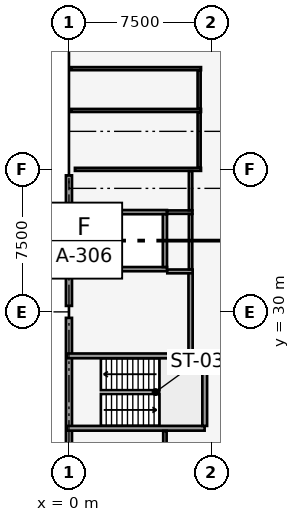
"""IFC4 building model, lengths in metres.
Left out: names, types, materials, properties, quantities, classifications, styles, units other than length and angle.
Written with IfcOpenShell. Run it as: python <this file> out.ifc"""

import sys

from ifc_helpers import new_model, si_unit, direction, frame, frame_2d, origin, origin_2d, place, context, subcontext, project, spatial, rectangle, extrude, element, fill, save


model = new_model("IFC4")
c1 = context("Model", 3, precision=1e-05, world=origin(), true_north=direction((0.0, 1.0)))
c2 = subcontext(c1, "Body", "Model", "MODEL_VIEW")
j1 = project(units=[si_unit("LENGTHUNIT", "METRE"), si_unit("PLANEANGLEUNIT", "RADIAN")], contexts=[c1])
p1 = place(None, origin())
s1 = spatial("IfcSite", under=j1, at=p1, CompositionType="ELEMENT")
p2 = place(p1, origin())
s2 = spatial("IfcBuilding", under=s1, at=p2, CompositionType="ELEMENT")
p3 = place(p2, frame((0.0, 0.0, 9.0)))
s3 = spatial("IfcBuildingStorey", under=s2, at=p3, CompositionType="ELEMENT", Elevation=9.0)
for number, where, z_axis, x_axis in (
    (1, (0.0, 30.0, 0.0), (0.0, 0.0, 1.0), (1.0, 0.0, 0.0)),
    (2, (0.0, 37.5, 0.0), (0.0, 0.0, 1.0), (1.0, 0.0, 0.0)),
):
    element("IfcColumn", number, at=place(p3, frame(where, z_axis=z_axis, x_axis=x_axis)), inside=s3, PredefinedType="COLUMN", context=c2, shape_type="SweptSolid", body=[
        extrude(rectangle(XDim=0.6, YDim=0.6, at=origin_2d()), origin(), (0.0, 0.0, 1.0), 4.2),
    ])
for number, where, z_axis, x_axis in (
    (3, (0.0, 22.815, 0.0), (0.0, 0.0, 1.0), (0.0, 1.0, 0.0)),
    (4, (0.0, 30.315, 0.0), (0.0, 0.0, 1.0), (0.0, 1.0, 0.0)),
):
    element("IfcWall", number, at=place(p3, frame(where, z_axis=z_axis, x_axis=x_axis)), inside=s3, PredefinedType="SOLIDWALL", context=c2, shape_type="SweptSolid", body=[
        extrude(rectangle(XDim=6.87, YDim=0.32, at=frame_2d((3.435, 0.0))), origin(), (0.0, 0.0, 1.0), 2.87),
    ])
p4 = place(p3, frame((-0.12, 23.875, 0.0), z_axis=(0.0, 0.0, 1.0), x_axis=(1.0, 0.0, 0.0)))
e5 = element("IfcWall", 5, at=p4, inside=s3, PredefinedType="SOLIDWALL", context=c2, shape_type="SweptSolid", body=[
    extrude(rectangle(XDim=7.26, YDim=0.25, at=frame_2d((3.63, 0.0))), origin(), (0.0, 0.0, 1.0), 3.92),
])
p5 = place(p3, frame((-0.12, 27.685, 0.0), z_axis=(0.0, 0.0, 1.0), x_axis=(1.0, 0.0, 0.0)))
e6 = element("IfcWall", 6, at=p5, inside=s3, PredefinedType="SOLIDWALL", context=c2, shape_type="SweptSolid", body=[
    extrude(rectangle(XDim=7.26, YDim=0.25, at=frame_2d((3.63, 0.0))), origin(), (0.0, 0.0, 1.0), 3.92),
])
p6 = place(p5, frame((0.45, 0.0, 0.0)))
e7 = element("IfcOpeningElement", 7, at=p6, cuts=e6, PredefinedType="OPENING", context=c2, shape_type="SweptSolid", body=[
    extrude(rectangle(XDim=1.1, YDim=2.15, at=frame_2d((0.55, 1.075))), frame((0.0, 0.135, 0.0), z_axis=(0.0, -1.0, 0.0), x_axis=(1.0, 0.0, 0.0)), (0.0, 0.0, 1.0), 0.27),
])
p7 = place(p3, frame((7.145, 24.0, 0.0), z_axis=(0.0, 0.0, 1.0), x_axis=(0.0, 1.0, 0.0)))
e8 = element("IfcWall", 8, at=p7, inside=s3, PredefinedType="SOLIDWALL", context=c2, shape_type="SweptSolid", body=[
    extrude(rectangle(XDim=3.56, YDim=0.25, at=frame_2d((1.78, 0.0))), origin(), (0.0, 0.0, 1.0), 3.92),
])
p8 = place(p3, frame((2.34, 32.25, 0.0), z_axis=(0.0, 0.0, 1.0), x_axis=(1.0, 0.0, 0.0)))
e9 = element("IfcWall", 9, at=p8, inside=s3, PredefinedType="SOLIDWALL", context=c2, shape_type="SweptSolid", body=[
    extrude(rectangle(XDim=2.82, YDim=0.22, at=frame_2d((1.41, 0.0))), origin(), (0.0, 0.0, 1.0), 3.92),
])
p9 = place(p8, frame((0.86, 0.0, 0.0)))
e10 = element("IfcOpeningElement", 10, at=p9, cuts=e9, PredefinedType="OPENING", context=c2, shape_type="SweptSolid", body=[
    extrude(rectangle(XDim=1.1, YDim=2.15, at=frame_2d((0.55, 1.075))), frame((0.0, 0.12, 0.0), z_axis=(0.0, -1.0, 0.0), x_axis=(1.0, 0.0, 0.0)), (0.0, 0.0, 1.0), 0.24),
])
p10 = place(p3, frame((2.34, 35.25, 0.0), z_axis=(0.0, 0.0, 1.0), x_axis=(1.0, 0.0, 0.0)))
e11 = element("IfcWall", 11, at=p10, inside=s3, PredefinedType="SOLIDWALL", context=c2, shape_type="SweptSolid", body=[
    extrude(rectangle(XDim=2.82, YDim=0.22, at=frame_2d((1.41, 0.0))), origin(), (0.0, 0.0, 1.0), 3.92),
])
for number, where, z_axis, x_axis in (
    (12, (2.45, 32.36, 0.0), (0.0, 0.0, 1.0), (0.0, 1.0, 0.0)),
    (13, (5.05, 32.36, 0.0), (0.0, 0.0, 1.0), (0.0, 1.0, 0.0)),
):
    element("IfcWall", number, at=place(p3, frame(where, z_axis=z_axis, x_axis=x_axis)), inside=s3, PredefinedType="SOLIDWALL", context=c2, shape_type="SweptSolid", body=[
        extrude(rectangle(XDim=2.78, YDim=0.22, at=frame_2d((1.39, 0.0))), origin(), (0.0, 0.0, 1.0), 3.92),
    ])
p11 = place(p3, frame((6.4, 27.82, 0.0), z_axis=(0.0, 0.0, 1.0), x_axis=(0.0, 1.0, 0.0)))
e14 = element("IfcWall", 14, at=p11, inside=s3, PredefinedType="SOLIDWALL", context=c2, shape_type="SweptSolid", body=[
    extrude(rectangle(XDim=4.31, YDim=0.22, at=frame_2d((2.155, 0.0))), origin(), (0.0, 0.0, 1.0), 3.92),
])
p12 = place(p11, frame((0.45, 0.0, 0.0)))
e15 = element("IfcOpeningElement", 15, at=p12, cuts=e14, PredefinedType="OPENING", context=c2, shape_type="SweptSolid", body=[
    extrude(rectangle(XDim=1.1, YDim=2.15, at=frame_2d((0.55, 1.075))), frame((0.0, 0.12, 0.0), z_axis=(0.0, -1.0, 0.0), x_axis=(1.0, 0.0, 0.0)), (0.0, 0.0, 1.0), 0.24),
])
p13 = place(p3, frame((0.18, 32.13, 0.0), z_axis=(0.0, 0.0, 1.0), x_axis=(1.0, 0.0, 0.0)))
e16 = element("IfcWall", 16, at=p13, inside=s3, PredefinedType="PARTITIONING", context=c2, shape_type="SweptSolid", body=[
    extrude(rectangle(XDim=2.145, YDim=0.2, at=frame_2d((1.073, 0.0))), origin(), (0.0, 0.0, 1.0), 3.13),
])
p14 = place(p3, frame((5.175, 32.13, 0.0), z_axis=(0.0, 0.0, 1.0), x_axis=(1.0, 0.0, 0.0)))
e17 = element("IfcWall", 17, at=p14, inside=s3, PredefinedType="PARTITIONING", context=c2, shape_type="SweptSolid", body=[
    extrude(rectangle(XDim=1.335, YDim=0.2, at=frame_2d((0.667, 0.0))), origin(), (0.0, 0.0, 1.0), 3.33),
])
p15 = place(p3, frame((5.05, 20.274, 0.0), z_axis=(0.0, 0.0, 1.0), x_axis=(0.0, 1.0, 0.0)))
e18 = element("IfcWall", 18, at=p15, inside=s3, PredefinedType="PARTITIONING", context=c2, shape_type="SweptSolid", body=[
    extrude(rectangle(XDim=3.462, YDim=0.18, at=frame_2d((1.731, 0.0))), origin(), (0.0, 0.0, 1.0), 2.87),
])
p16 = place(p3, frame((0.174, 35.25, 0.0), z_axis=(0.0, 0.0, 1.0), x_axis=(1.0, 0.0, 0.0)))
e19 = element("IfcWall", 19, at=p16, inside=s3, PredefinedType="PARTITIONING", context=c2, shape_type="SweptSolid", body=[
    extrude(rectangle(XDim=2.166, YDim=0.18, at=frame_2d((1.083, 0.0))), origin(), (0.0, 0.0, 1.0), 3.12),
])
p17 = place(p3, frame((5.16, 35.25, 0.0), z_axis=(0.0, 0.0, 1.0), x_axis=(1.0, 0.0, 0.0)))
e20 = element("IfcWall", 20, at=p17, inside=s3, PredefinedType="PARTITIONING", context=c2, shape_type="SweptSolid", body=[
    extrude(rectangle(XDim=1.34, YDim=0.18, at=frame_2d((0.67, 0.0))), origin(), (0.0, 0.0, 1.0), 3.27),
])
p18 = place(p3, frame((0.314, 37.5, 0.0), z_axis=(0.0, 0.0, 1.0), x_axis=(1.0, 0.0, 0.0)))
e21 = element("IfcWall", 21, at=p18, inside=s3, PredefinedType="PARTITIONING", context=c2, shape_type="SweptSolid", body=[
    extrude(rectangle(XDim=6.636, YDim=0.16, at=frame_2d((3.318, 0.0))), origin(), (0.0, 0.0, 1.0), 2.87),
])
p19 = place(p3, frame((6.4, 32.244, 0.0), z_axis=(0.0, 0.0, 1.0), x_axis=(0.0, 1.0, 0.0)))
e22 = element("IfcWall", 22, at=p19, inside=s3, PredefinedType="PARTITIONING", context=c2, shape_type="SweptSolid", body=[
    extrude(rectangle(XDim=2.902, YDim=0.18, at=frame_2d((1.451, 0.0))), origin(), (0.0, 0.0, 1.0), 3.27),
])
p20 = place(p3, frame((6.4, 35.354, 0.0), z_axis=(0.0, 0.0, 1.0), x_axis=(0.0, 1.0, 0.0)))
e23 = element("IfcWall", 23, at=p20, inside=s3, PredefinedType="PARTITIONING", context=c2, shape_type="SweptSolid", body=[
    extrude(rectangle(XDim=2.052, YDim=0.18, at=frame_2d((1.026, 0.0))), origin(), (0.0, 0.0, 1.0), 2.87),
])
p21 = place(p20, frame((0.546, 0.0, 0.0)))
e24 = element("IfcOpeningElement", 24, at=p21, cuts=e23, PredefinedType="OPENING", context=c2, shape_type="SweptSolid", body=[
    extrude(rectangle(XDim=0.9, YDim=2.1, at=frame_2d((0.45, 1.05))), frame((0.0, 0.1, 0.0), z_axis=(0.0, -1.0, 0.0), x_axis=(1.0, 0.0, 0.0)), (0.0, 0.0, 1.0), 0.2),
])
for number, where, z_axis, x_axis in (
    (25, (0.112, 40.6, 0.0), (0.0, 0.0, 1.0), (1.0, 0.0, 0.0)),
    (26, (0.112, 42.8, 0.0), (0.0, 0.0, 1.0), (1.0, 0.0, 0.0)),
):
    element("IfcWall", number, at=place(p3, frame(where, z_axis=z_axis, x_axis=x_axis)), inside=s3, PredefinedType="PARTITIONING", context=c2, shape_type="SweptSolid", body=[
        extrude(rectangle(XDim=6.838, YDim=0.16, at=frame_2d((3.419, 0.0))), origin(), (0.0, 0.0, 1.0), 3.27),
    ])
p22 = place(p3, frame((6.85, 37.594, 0.0), z_axis=(0.0, 0.0, 1.0), x_axis=(0.0, 1.0, 0.0)))
e27 = element("IfcWall", 27, at=p22, inside=s3, PredefinedType="PARTITIONING", context=c2, shape_type="SweptSolid", body=[
    extrude(rectangle(XDim=2.912, YDim=0.16, at=frame_2d((1.456, 0.0))), origin(), (0.0, 0.0, 1.0), 2.87),
])
p23 = place(p22, frame((0.981, 0.0, 0.0)))
e28 = element("IfcOpeningElement", 28, at=p23, cuts=e27, PredefinedType="OPENING", context=c2, shape_type="SweptSolid", body=[
    extrude(rectangle(XDim=0.95, YDim=2.1, at=frame_2d((0.475, 1.05))), frame((0.0, 0.09, 0.0), z_axis=(0.0, -1.0, 0.0), x_axis=(1.0, 0.0, 0.0)), (0.0, 0.0, 1.0), 0.18),
])
p24 = place(p3, frame((6.85, 40.694, 0.0), z_axis=(0.0, 0.0, 1.0), x_axis=(0.0, 1.0, 0.0)))
e29 = element("IfcWall", 29, at=p24, inside=s3, PredefinedType="PARTITIONING", context=c2, shape_type="SweptSolid", body=[
    extrude(rectangle(XDim=2.012, YDim=0.16, at=frame_2d((1.006, 0.0))), origin(), (0.0, 0.0, 1.0), 3.27),
])
p25 = place(p24, frame((0.556, 0.0, 0.0)))
e30 = element("IfcOpeningElement", 30, at=p25, cuts=e29, PredefinedType="OPENING", context=c2, shape_type="SweptSolid", body=[
    extrude(rectangle(XDim=0.9, YDim=2.1, at=frame_2d((0.45, 1.05))), frame((0.0, 0.09, 0.0), z_axis=(0.0, -1.0, 0.0), x_axis=(1.0, 0.0, 0.0)), (0.0, 0.0, 1.0), 0.18),
])
p26 = place(p6, origin())
e31 = element("IfcDoor", 31, at=p26, inside=s3, OperationType="SINGLE_SWING_RIGHT", PredefinedType="DOOR", context=c2, shape_type="SweptSolid", body=[
    extrude(rectangle(XDim=1.1, YDim=2.15, at=frame_2d((0.55, 1.075))), frame((0.0, 0.025, 0.0), z_axis=(0.0, -1.0, 0.0), x_axis=(1.0, 0.0, 0.0)), (0.0, 0.0, 1.0), 0.05),
])
fill(e7, e31)
p27 = place(p9, origin())
e32 = element("IfcDoor", 32, at=p27, inside=s3, OperationType="SLIDING_TO_LEFT", PredefinedType="DOOR", context=c2, shape_type="SweptSolid", body=[
    extrude(rectangle(XDim=1.1, YDim=2.15, at=frame_2d((0.55, 1.075))), frame((0.0, 0.025, 0.0), z_axis=(0.0, -1.0, 0.0), x_axis=(1.0, 0.0, 0.0)), (0.0, 0.0, 1.0), 0.05),
])
fill(e10, e32)
p28 = place(p12, origin())
e33 = element("IfcDoor", 33, at=p28, inside=s3, OperationType="SINGLE_SWING_RIGHT", PredefinedType="DOOR", context=c2, shape_type="SweptSolid", body=[
    extrude(rectangle(XDim=1.1, YDim=2.15, at=frame_2d((0.55, 1.075))), frame((0.0, 0.025, 0.0), z_axis=(0.0, -1.0, 0.0), x_axis=(1.0, 0.0, 0.0)), (0.0, 0.0, 1.0), 0.05),
])
fill(e15, e33)
p29 = place(p21, origin())
e34 = element("IfcDoor", 34, at=p29, inside=s3, OperationType="SINGLE_SWING_LEFT", PredefinedType="DOOR", context=c2, shape_type="SweptSolid", body=[
    extrude(rectangle(XDim=0.9, YDim=2.1, at=frame_2d((0.45, 1.05))), frame((0.0, 0.025, 0.0), z_axis=(0.0, -1.0, 0.0), x_axis=(1.0, 0.0, 0.0)), (0.0, 0.0, 1.0), 0.05),
])
fill(e24, e34)
p30 = place(p23, origin())
e35 = element("IfcDoor", 35, at=p30, inside=s3, OperationType="SINGLE_SWING_RIGHT", PredefinedType="DOOR", context=c2, shape_type="SweptSolid", body=[
    extrude(rectangle(XDim=0.95, YDim=2.1, at=frame_2d((0.475, 1.05))), frame((0.0, 0.025, 0.0), z_axis=(0.0, -1.0, 0.0), x_axis=(1.0, 0.0, 0.0)), (0.0, 0.0, 1.0), 0.05),
])
fill(e28, e35)
p31 = place(p25, origin())
e36 = element("IfcDoor", 36, at=p31, inside=s3, OperationType="SINGLE_SWING_LEFT", PredefinedType="DOOR", context=c2, shape_type="SweptSolid", body=[
    extrude(rectangle(XDim=0.9, YDim=2.1, at=frame_2d((0.45, 1.05))), frame((0.0, 0.025, 0.0), z_axis=(0.0, -1.0, 0.0), x_axis=(1.0, 0.0, 0.0)), (0.0, 0.0, 1.0), 0.05),
])
fill(e30, e36)
save(model, sys.argv[1])
